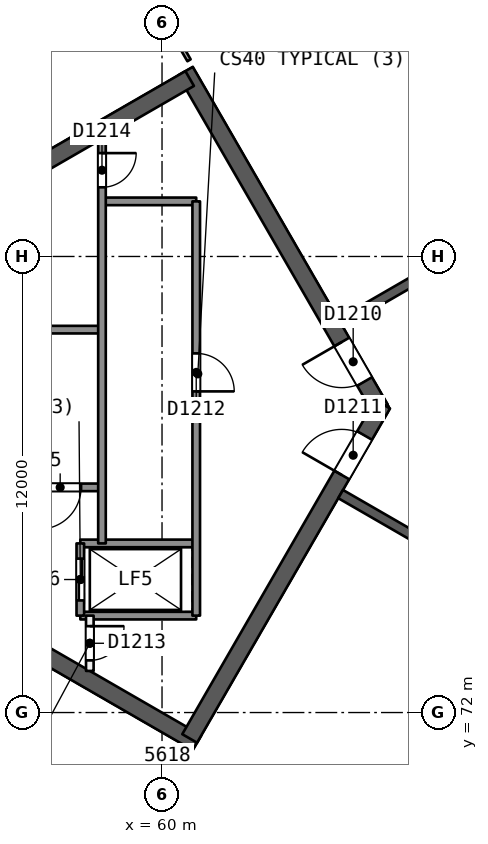
"""IFC4 building model, lengths in metres.
Left out: names, types, materials, properties, quantities, classifications, styles, units other than length and angle.
Written with IfcOpenShell. Run it as: python <this file> out.ifc"""

import sys

from ifc_helpers import new_model, si_unit, direction, frame, frame_2d, origin, place, context, subcontext, project, spatial, rectangle, extrude, element, fill, save


model = new_model("IFC4")
c1 = context("Model", 3, precision=1e-05, world=origin(), true_north=direction((0.0, 1.0)))
c2 = subcontext(c1, "Body", "Model", "MODEL_VIEW")
j1 = project(units=[si_unit("LENGTHUNIT", "METRE"), si_unit("PLANEANGLEUNIT", "RADIAN")], contexts=[c1])
p1 = place(None, origin())
s1 = spatial("IfcSite", under=j1, at=p1, CompositionType="ELEMENT")
p2 = place(p1, origin())
s2 = spatial("IfcBuilding", under=s1, at=p2, CompositionType="ELEMENT")
p3 = place(p2, frame((0.0, 0.0, 228.0)))
s3 = spatial("IfcBuildingStorey", under=s2, at=p3, CompositionType="ELEMENT", Elevation=228.0)
p4 = place(p3, frame((65.74, 80.0, 0.0), z_axis=(0.0, 0.0, 1.0), x_axis=(-0.499991857942, 0.866030104553, 0.0)))
e1 = element("IfcWall", 1, at=p4, inside=s3, PredefinedType="SHEAR", context=c2, shape_type="SweptSolid", body=[
    extrude(rectangle(XDim=10.25, YDim=0.45, at=frame_2d((5.125, 0.0))), origin(), (0.0, 0.0, 1.0), 3.7),
])
p5 = place(p4, frame((0.82, 0.0, 0.0)))
e2 = element("IfcOpeningElement", 2, at=p5, cuts=e1, PredefinedType="OPENING", context=c2, shape_type="SweptSolid", body=[
    extrude(rectangle(XDim=1.2, YDim=2.1, at=frame_2d((0.6, 1.05))), frame((0.0, 0.235, 0.0), z_axis=(0.0, -1.0, 0.0), x_axis=(1.0, 0.0, 0.0)), (0.0, 0.0, 1.0), 0.471),
])
p6 = place(p3, frame((60.728, 88.682, 0.0), z_axis=(0.0, 0.0, 1.0), x_axis=(-0.866021613849, -0.500006564303, 0.0)))
e3 = element("IfcWall", 3, at=p6, inside=s3, PredefinedType="SHEAR", context=c2, shape_type="SweptSolid", body=[
    extrude(rectangle(XDim=14.108, YDim=0.45, at=frame_2d((7.054, 0.0))), origin(), (0.0, 0.0, 1.0), 3.7),
])
p7 = place(p3, frame((48.622, 78.307, 0.0), z_axis=(0.0, 0.0, 1.0), x_axis=(0.86602701116, -0.499997215934, 0.0)))
e4 = element("IfcWall", 4, at=p7, inside=s3, PredefinedType="SHEAR", context=c2, shape_type="SweptSolid", body=[
    extrude(rectangle(XDim=14.204, YDim=0.45, at=frame_2d((7.102, 0.0))), origin(), (0.0, 0.0, 1.0), 3.7),
])
p8 = place(p3, frame((60.728, 71.318, 0.0), z_axis=(0.0, 0.0, 1.0), x_axis=(0.500012416173, 0.866018235185, 0.0)))
e5 = element("IfcWall", 5, at=p8, inside=s3, PredefinedType="SHEAR", context=c2, shape_type="SweptSolid", body=[
    extrude(rectangle(XDim=10.155, YDim=0.45, at=frame_2d((5.078, 0.0))), origin(), (0.0, 0.0, 1.0), 3.7),
])
p9 = place(p8, frame((8.005, 0.0, 0.0)))
e6 = element("IfcOpeningElement", 6, at=p9, cuts=e5, PredefinedType="OPENING", context=c2, shape_type="SweptSolid", body=[
    extrude(rectangle(XDim=1.2, YDim=2.1, at=frame_2d((0.6, 1.05))), frame((0.0, 0.235, 0.0), z_axis=(0.0, -1.0, 0.0), x_axis=(1.0, 0.0, 0.0)), (0.0, 0.0, 1.0), 0.471),
])
p10 = place(p3, frame((78.2, 90.046, 0.0), z_axis=(0.0, 0.0, 1.0), x_axis=(-0.866026492143, -0.499998114903, 0.0)))
e7 = element("IfcWall", 7, at=p10, inside=s3, PredefinedType="SHEAR", context=c2, shape_type="SweptSolid", body=[
    extrude(rectangle(XDim=15.588, YDim=0.25, at=frame_2d((7.794, 0.0))), origin(), (0.0, 0.0, 1.0), 3.3),
])
p11 = place(p10, frame((2.15, 0.0, 0.0)))
e8 = element("IfcOpeningElement", 8, at=p11, cuts=e7, PredefinedType="OPENING", context=c2, shape_type="SweptSolid", body=[
    extrude(rectangle(XDim=1.0, YDim=2.1, at=frame_2d((0.5, 1.05))), frame((0.0, 0.135, 0.0), z_axis=(0.0, -1.0, 0.0), x_axis=(1.0, 0.0, 0.0)), (0.0, 0.0, 1.0), 0.271),
])
p12 = place(p10, frame((8.538, 0.0, 0.0)))
e9 = element("IfcOpeningElement", 9, at=p12, cuts=e7, PredefinedType="OPENING", context=c2, shape_type="SweptSolid", body=[
    extrude(rectangle(XDim=1.1, YDim=2.1, at=frame_2d((0.55, 1.05))), frame((0.0, 0.135, 0.0), z_axis=(0.0, -1.0, 0.0), x_axis=(1.0, 0.0, 0.0)), (0.0, 0.0, 1.0), 0.271),
])
p13 = place(p10, frame((12.282, 0.0, 0.0)))
e10 = element("IfcOpeningElement", 10, at=p13, cuts=e7, PredefinedType="OPENING", context=c2, shape_type="SweptSolid", body=[
    extrude(rectangle(XDim=1.0, YDim=2.1, at=frame_2d((0.5, 1.05))), frame((0.0, 0.135, 0.0), z_axis=(0.0, -1.0, 0.0), x_axis=(1.0, 0.0, 0.0)), (0.0, 0.0, 1.0), 0.271),
])
p14 = place(p3, frame((64.7, 77.748, 0.0), z_axis=(0.0, 0.0, 1.0), x_axis=(0.866026492143, -0.499998114903, 0.0)))
e11 = element("IfcWall", 11, at=p14, inside=s3, PredefinedType="SHEAR", context=c2, shape_type="SweptSolid", body=[
    extrude(rectangle(XDim=15.588, YDim=0.25, at=frame_2d((7.794, 0.0))), origin(), (0.0, 0.0, 1.0), 3.3),
])
p15 = place(p14, frame((2.462, 0.0, 0.0)))
e12 = element("IfcOpeningElement", 12, at=p15, cuts=e11, PredefinedType="OPENING", context=c2, shape_type="SweptSolid", body=[
    extrude(rectangle(XDim=1.0, YDim=2.1, at=frame_2d((0.5, 1.05))), frame((0.0, 0.135, 0.0), z_axis=(0.0, -1.0, 0.0), x_axis=(1.0, 0.0, 0.0)), (0.0, 0.0, 1.0), 0.271),
])
p16 = place(p14, frame((9.474, 0.0, 0.0)))
e13 = element("IfcOpeningElement", 13, at=p16, cuts=e11, PredefinedType="OPENING", context=c2, shape_type="SweptSolid", body=[
    extrude(rectangle(XDim=1.1, YDim=2.1, at=frame_2d((0.55, 1.05))), frame((0.0, 0.135, 0.0), z_axis=(0.0, -1.0, 0.0), x_axis=(1.0, 0.0, 0.0)), (0.0, 0.0, 1.0), 0.271),
])
p17 = place(p14, frame((12.906, 0.0, 0.0)))
e14 = element("IfcOpeningElement", 14, at=p17, cuts=e11, PredefinedType="OPENING", context=c2, shape_type="SweptSolid", body=[
    extrude(rectangle(XDim=1.0, YDim=2.1, at=frame_2d((0.5, 1.05))), frame((0.0, 0.135, 0.0), z_axis=(0.0, -1.0, 0.0), x_axis=(1.0, 0.0, 0.0)), (0.0, 0.0, 1.0), 0.271),
])
p18 = place(p3, frame((64.433, 93.938, 0.0), z_axis=(0.0, 0.0, 1.0), x_axis=(0.500011000363, -0.866019052629, 0.0)))
e15 = element("IfcWall", 15, at=p18, inside=s3, PredefinedType="PARTITIONING", context=c2, shape_type="SweptSolid", body=[
    extrude(rectangle(XDim=10.254, YDim=0.2, at=frame_2d((5.127, 0.0))), origin(), (0.0, 0.0, 1.0), 3.3),
])
p19 = place(p3, frame((59.573, 91.132, 0.0), z_axis=(0.0, 0.0, 1.0), x_axis=(0.499948534732, -0.866055115232, 0.0)))
e16 = element("IfcWall", 16, at=p19, inside=s3, PredefinedType="PARTITIONING", context=c2, shape_type="SweptSolid", body=[
    extrude(rectangle(XDim=2.275, YDim=0.1, at=frame_2d((1.137, 0.0))), origin(), (0.0, 0.0, 1.0), 3.3),
])
p20 = place(p19, frame((0.687, 0.0, 0.0)))
e17 = element("IfcOpeningElement", 17, at=p20, cuts=e16, PredefinedType="OPENING", context=c2, shape_type="SweptSolid", body=[
    extrude(rectangle(XDim=0.9, YDim=2.1, at=frame_2d((0.45, 1.05))), frame((0.0, 0.061, 0.0), z_axis=(0.0, -1.0, 0.0), x_axis=(1.0, 0.0, 0.0)), (0.0, 0.0, 1.0), 0.121),
])
p21 = place(p3, frame((60.71, 70.838, 0.0), z_axis=(0.0, 0.0, 1.0), x_axis=(-0.499948534732, -0.866055115232, 0.0)))
e18 = element("IfcWall", 18, at=p21, inside=s3, PredefinedType="PARTITIONING", context=c2, shape_type="SweptSolid", body=[
    extrude(rectangle(XDim=2.275, YDim=0.1, at=frame_2d((1.137, 0.0))), origin(), (0.0, 0.0, 1.0), 3.3),
])
p22 = place(p21, frame((0.687, 0.0, 0.0)))
e19 = element("IfcOpeningElement", 19, at=p22, cuts=e18, PredefinedType="OPENING", context=c2, shape_type="SweptSolid", body=[
    extrude(rectangle(XDim=0.9, YDim=2.1, at=frame_2d((0.45, 1.05))), frame((0.0, 0.061, 0.0), z_axis=(0.0, -1.0, 0.0), x_axis=(1.0, 0.0, 0.0)), (0.0, 0.0, 1.0), 0.121),
])
p23 = place(p3, frame((64.703, 65.907, 0.0), z_axis=(0.0, 0.0, 1.0), x_axis=(0.500019628412, 0.866014071019, 0.0)))
e20 = element("IfcWall", 20, at=p23, inside=s3, PredefinedType="PARTITIONING", context=c2, shape_type="SweptSolid", body=[
    extrude(rectangle(XDim=7.254, YDim=0.2, at=frame_2d((3.627, 0.0))), origin(), (0.0, 0.0, 1.0), 3.3),
])
p24 = place(p3, frame((44.454, 82.574, 0.0), z_axis=(0.0, 0.0, 1.0), x_axis=(0.86602387423, 0.500002649256, 0.0)))
e21 = element("IfcWall", 21, at=p24, inside=s3, PredefinedType="SOLIDWALL", context=c2, shape_type="SweptSolid", body=[
    extrude(rectangle(XDim=50.333, YDim=0.3, at=frame_2d((25.167, 0.0))), origin(), (0.0, 0.0, 1.0), 3.3),
])
p25 = place(p24, frame((24.122, 0.0, 0.0)))
e22 = element("IfcOpeningElement", 22, at=p25, cuts=e21, PredefinedType="OPENING", context=c2, shape_type="SweptSolid", body=[
    extrude(rectangle(XDim=2.4, YDim=2.4, at=frame_2d((1.2, 1.2))), frame((0.0, 0.161, 0.0), z_axis=(0.0, -1.0, 0.0), x_axis=(1.0, 0.0, 0.0)), (0.0, 0.0, 1.0), 0.321),
])
p26 = place(p24, frame((29.111, 0.0, 0.0)))
e23 = element("IfcOpeningElement", 23, at=p26, cuts=e21, PredefinedType="OPENING", context=c2, shape_type="SweptSolid", body=[
    extrude(rectangle(XDim=2.4, YDim=2.4, at=frame_2d((1.2, 1.2))), frame((0.0, 0.161, 0.0), z_axis=(0.0, -1.0, 0.0), x_axis=(1.0, 0.0, 0.0)), (0.0, 0.0, 1.0), 0.321),
])
p27 = place(p24, frame((39.164, 0.0, 0.0)))
e24 = element("IfcOpeningElement", 24, at=p27, cuts=e21, PredefinedType="OPENING", context=c2, shape_type="SweptSolid", body=[
    extrude(rectangle(XDim=2.4, YDim=2.4, at=frame_2d((1.2, 1.2))), frame((0.0, 0.161, 0.0), z_axis=(0.0, -1.0, 0.0), x_axis=(1.0, 0.0, 0.0)), (0.0, 0.0, 1.0), 0.321),
])
p28 = place(p24, frame((18.978, 0.0, 0.0)))
e25 = element("IfcOpeningElement", 25, at=p28, cuts=e21, PredefinedType="OPENING", context=c2, shape_type="SweptSolid", body=[
    extrude(rectangle(XDim=2.4, YDim=2.4, at=frame_2d((1.2, 1.2))), frame((0.0, 0.161, 0.0), z_axis=(0.0, -1.0, 0.0), x_axis=(1.0, 0.0, 0.0)), (0.0, 0.0, 1.0), 0.321),
])
p29 = place(p24, frame((8.763, 0.0, 0.0)))
e26 = element("IfcOpeningElement", 26, at=p29, cuts=e21, PredefinedType="OPENING", context=c2, shape_type="SweptSolid", body=[
    extrude(rectangle(XDim=2.4, YDim=2.4, at=frame_2d((1.2, 1.2))), frame((0.0, 0.161, 0.0), z_axis=(0.0, -1.0, 0.0), x_axis=(1.0, 0.0, 0.0)), (0.0, 0.0, 1.0), 0.321),
])
p30 = place(p3, frame((88.043, 52.259, 0.0), z_axis=(0.0, 0.0, 1.0), x_axis=(-0.86602387423, 0.500002649256, 0.0)))
e27 = element("IfcWall", 27, at=p30, inside=s3, PredefinedType="SOLIDWALL", context=c2, shape_type="SweptSolid", body=[
    extrude(rectangle(XDim=50.333, YDim=0.3, at=frame_2d((25.167, 0.0))), origin(), (0.0, 0.0, 1.0), 3.3),
])
p31 = place(p30, frame((23.187, 0.0, 0.0)))
e28 = element("IfcOpeningElement", 28, at=p31, cuts=e27, PredefinedType="OPENING", context=c2, shape_type="SweptSolid", body=[
    extrude(rectangle(XDim=2.4, YDim=2.4, at=frame_2d((1.2, 1.2))), frame((0.0, 0.161, 0.0), z_axis=(0.0, -1.0, 0.0), x_axis=(1.0, 0.0, 0.0)), (0.0, 0.0, 1.0), 0.321),
])
p32 = place(p30, frame((28.799, 0.0, 0.0)))
e29 = element("IfcOpeningElement", 29, at=p32, cuts=e27, PredefinedType="OPENING", context=c2, shape_type="SweptSolid", body=[
    extrude(rectangle(XDim=2.4, YDim=2.4, at=frame_2d((1.2, 1.2))), frame((0.0, 0.161, 0.0), z_axis=(0.0, -1.0, 0.0), x_axis=(1.0, 0.0, 0.0)), (0.0, 0.0, 1.0), 0.321),
])
p33 = place(p30, frame((39.164, 0.0, 0.0)))
e30 = element("IfcOpeningElement", 30, at=p33, cuts=e27, PredefinedType="OPENING", context=c2, shape_type="SweptSolid", body=[
    extrude(rectangle(XDim=2.4, YDim=2.4, at=frame_2d((1.2, 1.2))), frame((0.0, 0.161, 0.0), z_axis=(0.0, -1.0, 0.0), x_axis=(1.0, 0.0, 0.0)), (0.0, 0.0, 1.0), 0.321),
])
p34 = place(p30, frame((18.354, 0.0, 0.0)))
e31 = element("IfcOpeningElement", 31, at=p34, cuts=e27, PredefinedType="OPENING", context=c2, shape_type="SweptSolid", body=[
    extrude(rectangle(XDim=2.4, YDim=2.4, at=frame_2d((1.2, 1.2))), frame((0.0, 0.161, 0.0), z_axis=(0.0, -1.0, 0.0), x_axis=(1.0, 0.0, 0.0)), (0.0, 0.0, 1.0), 0.321),
])
p35 = place(p30, frame((8.763, 0.0, 0.0)))
e32 = element("IfcOpeningElement", 32, at=p35, cuts=e27, PredefinedType="OPENING", context=c2, shape_type="SweptSolid", body=[
    extrude(rectangle(XDim=2.4, YDim=2.4, at=frame_2d((1.2, 1.2))), frame((0.0, 0.161, 0.0), z_axis=(0.0, -1.0, 0.0), x_axis=(1.0, 0.0, 0.0)), (0.0, 0.0, 1.0), 0.321),
])
p36 = place(p3, frame((60.9, 85.45, 0.0), z_axis=(0.0, 0.0, 1.0), x_axis=(-1.0, 0.0, 0.0)))
e33 = element("IfcWall", 33, at=p36, inside=s3, PredefinedType="SOLIDWALL", context=c2, shape_type="SweptSolid", body=[
    extrude(rectangle(XDim=2.48, YDim=0.2, at=frame_2d((1.24, 0.0))), origin(), (0.0, 0.0, 1.0), 3.3),
])
p37 = place(p3, frame((58.42, 82.075, 0.0), z_axis=(0.0, 0.0, 1.0), x_axis=(-1.0, 0.0, 0.0)))
e34 = element("IfcWall", 34, at=p37, inside=s3, PredefinedType="SOLIDWALL", context=c2, shape_type="SweptSolid", body=[
    extrude(rectangle(XDim=7.7, YDim=0.2, at=frame_2d((3.85, 0.0))), origin(), (0.0, 0.0, 1.0), 3.3),
])
p38 = place(p3, frame((58.42, 77.925, 0.0), z_axis=(0.0, 0.0, 1.0), x_axis=(-1.0, 0.0, 0.0)))
e35 = element("IfcWall", 35, at=p38, inside=s3, PredefinedType="SOLIDWALL", context=c2, shape_type="SweptSolid", body=[
    extrude(rectangle(XDim=7.7, YDim=0.2, at=frame_2d((3.85, 0.0))), origin(), (0.0, 0.0, 1.0), 3.3),
])
p39 = place(p38, frame((0.55, 0.0, 0.0)))
e36 = element("IfcOpeningElement", 36, at=p39, cuts=e35, PredefinedType="OPENING", context=c2, shape_type="SweptSolid", body=[
    extrude(rectangle(XDim=1.1, YDim=2.1, at=frame_2d((0.55, 1.05))), frame((0.0, 0.11, 0.0), z_axis=(0.0, -1.0, 0.0), x_axis=(1.0, 0.0, 0.0)), (0.0, 0.0, 1.0), 0.221),
])
for number, where, z_axis, x_axis in (
    (37, (60.9, 76.45, 0.0), (0.0, 0.0, 1.0), (-1.0, 0.0, 0.0)),
    (38, (60.9, 74.55, 0.0), (0.0, 0.0, 1.0), (-1.0, 0.0, 0.0)),
):
    element("IfcWall", number, at=place(p3, frame(where, z_axis=z_axis, x_axis=x_axis)), inside=s3, PredefinedType="SOLIDWALL", context=c2, shape_type="SweptSolid", body=[
        extrude(rectangle(XDim=3.05, YDim=0.2, at=frame_2d((1.525, 0.0))), origin(), (0.0, 0.0, 1.0), 3.3),
    ])
p40 = place(p3, frame((60.9, 85.45, 0.0), z_axis=(0.0, 0.0, 1.0), x_axis=(0.0, -1.0, 0.0)))
e39 = element("IfcWall", 39, at=p40, inside=s3, PredefinedType="SOLIDWALL", context=c2, shape_type="SweptSolid", body=[
    extrude(rectangle(XDim=10.9, YDim=0.2, at=frame_2d((5.45, 0.0))), origin(), (0.0, 0.0, 1.0), 3.3),
])
p41 = place(p40, frame((4.0, 0.0, 0.0)))
e40 = element("IfcOpeningElement", 40, at=p41, cuts=e39, PredefinedType="OPENING", context=c2, shape_type="SweptSolid", body=[
    extrude(rectangle(XDim=1.0, YDim=2.1, at=frame_2d((0.5, 1.05))), frame((0.0, 0.11, 0.0), z_axis=(0.0, -1.0, 0.0), x_axis=(1.0, 0.0, 0.0)), (0.0, 0.0, 1.0), 0.221),
])
p42 = place(p3, frame((58.42, 87.09, 0.0), z_axis=(0.0, 0.0, 1.0), x_axis=(0.0, -1.0, 0.0)))
e41 = element("IfcWall", 41, at=p42, inside=s3, PredefinedType="SOLIDWALL", context=c2, shape_type="SweptSolid", body=[
    extrude(rectangle(XDim=10.64, YDim=0.2, at=frame_2d((5.32, 0.0))), origin(), (0.0, 0.0, 1.0), 3.3),
])
p43 = place(p42, frame((0.37, 0.0, 0.0)))
e42 = element("IfcOpeningElement", 42, at=p43, cuts=e41, PredefinedType="OPENING", context=c2, shape_type="SweptSolid", body=[
    extrude(rectangle(XDim=0.9, YDim=2.1, at=frame_2d((0.45, 1.05))), frame((0.0, 0.11, 0.0), z_axis=(0.0, -1.0, 0.0), x_axis=(1.0, 0.0, 0.0)), (0.0, 0.0, 1.0), 0.221),
])
p44 = place(p3, frame((58.1, 74.55, 0.0), z_axis=(0.0, 0.0, 1.0), x_axis=(0.0, -1.0, 0.0)))
e43 = element("IfcWall", 43, at=p44, inside=s3, PredefinedType="PARTITIONING", context=c2, shape_type="SweptSolid", body=[
    extrude(rectangle(XDim=1.455, YDim=0.2, at=frame_2d((0.728, 0.0))), origin(), (0.0, 0.0, 1.0), 3.3),
])
p45 = place(p44, frame((0.278, 0.0, 0.0)))
e44 = element("IfcOpeningElement", 44, at=p45, cuts=e43, PredefinedType="OPENING", context=c2, shape_type="SweptSolid", body=[
    extrude(rectangle(XDim=0.9, YDim=2.1, at=frame_2d((0.45, 1.05))), frame((0.0, 0.11, 0.0), z_axis=(0.0, -1.0, 0.0), x_axis=(1.0, 0.0, 0.0)), (0.0, 0.0, 1.0), 0.221),
])
p46 = place(p3, frame((57.85, 76.45, 0.0), z_axis=(0.0, 0.0, 1.0), x_axis=(0.0, -1.0, 0.0)))
e45 = element("IfcWall", 45, at=p46, inside=s3, PredefinedType="SOLIDWALL", context=c2, shape_type="SweptSolid", body=[
    extrude(rectangle(XDim=1.9, YDim=0.2, at=frame_2d((0.95, 0.0))), origin(), (0.0, 0.0, 1.0), 3.3),
])
p47 = place(p46, frame((0.4, 0.0, 0.0)))
e46 = element("IfcOpeningElement", 46, at=p47, cuts=e45, PredefinedType="OPENING", context=c2, shape_type="SweptSolid", body=[
    extrude(rectangle(XDim=1.1, YDim=2.1, at=frame_2d((0.55, 1.05))), frame((0.0, 0.11, 0.0), z_axis=(0.0, -1.0, 0.0), x_axis=(1.0, 0.0, 0.0)), (0.0, 0.0, 1.0), 0.221),
])
p48 = place(p5, origin())
e47 = element("IfcDoor", 47, at=p48, inside=s3, OperationType="SINGLE_SWING_RIGHT", PredefinedType="NOTDEFINED", context=c2, shape_type="SweptSolid", body=[
    extrude(rectangle(XDim=1.2, YDim=2.1, at=frame_2d((0.6, 1.05))), frame((0.0, 0.025, 0.0), z_axis=(0.0, -1.0, 0.0), x_axis=(1.0, 0.0, 0.0)), (0.0, 0.0, 1.0), 0.05),
])
fill(e2, e47)
p49 = place(p9, origin())
e48 = element("IfcDoor", 48, at=p49, inside=s3, OperationType="SINGLE_SWING_LEFT", PredefinedType="NOTDEFINED", context=c2, shape_type="SweptSolid", body=[
    extrude(rectangle(XDim=1.2, YDim=2.1, at=frame_2d((0.6, 1.05))), frame((0.0, 0.025, 0.0), z_axis=(0.0, -1.0, 0.0), x_axis=(1.0, 0.0, 0.0)), (0.0, 0.0, 1.0), 0.05),
])
fill(e6, e48)
p50 = place(p47, origin())
e49 = element("IfcDoor", 49, at=p50, inside=s3, OperationType="SLIDING_TO_RIGHT", PredefinedType="NOTDEFINED", context=c2, shape_type="SweptSolid", body=[
    extrude(rectangle(XDim=1.1, YDim=2.1, at=frame_2d((0.55, 1.05))), frame((0.0, 0.025, 0.0), z_axis=(0.0, -1.0, 0.0), x_axis=(1.0, 0.0, 0.0)), (0.0, 0.0, 1.0), 0.05),
])
fill(e46, e49)
p51 = place(p41, origin())
e50 = element("IfcDoor", 50, at=p51, inside=s3, OperationType="SINGLE_SWING_RIGHT", PredefinedType="NOTDEFINED", context=c2, shape_type="SweptSolid", body=[
    extrude(rectangle(XDim=1.0, YDim=2.1, at=frame_2d((0.5, 1.05))), frame((0.0, 0.025, 0.0), z_axis=(0.0, -1.0, 0.0), x_axis=(1.0, 0.0, 0.0)), (0.0, 0.0, 1.0), 0.05),
])
fill(e40, e50)
p52 = place(p45, origin())
e51 = element("IfcDoor", 51, at=p52, inside=s3, OperationType="SINGLE_SWING_LEFT", PredefinedType="NOTDEFINED", context=c2, shape_type="SweptSolid", body=[
    extrude(rectangle(XDim=0.9, YDim=2.1, at=frame_2d((0.45, 1.05))), frame((0.0, 0.025, 0.0), z_axis=(0.0, -1.0, 0.0), x_axis=(1.0, 0.0, 0.0)), (0.0, 0.0, 1.0), 0.05),
])
fill(e44, e51)
p53 = place(p43, origin())
e52 = element("IfcDoor", 52, at=p53, inside=s3, OperationType="SINGLE_SWING_LEFT", PredefinedType="NOTDEFINED", context=c2, shape_type="SweptSolid", body=[
    extrude(rectangle(XDim=0.9, YDim=2.1, at=frame_2d((0.45, 1.05))), frame((0.0, 0.025, 0.0), z_axis=(0.0, -1.0, 0.0), x_axis=(1.0, 0.0, 0.0)), (0.0, 0.0, 1.0), 0.05),
])
fill(e42, e52)
p54 = place(p39, origin())
e53 = element("IfcDoor", 53, at=p54, inside=s3, OperationType="SINGLE_SWING_RIGHT", PredefinedType="NOTDEFINED", context=c2, shape_type="SweptSolid", body=[
    extrude(rectangle(XDim=1.1, YDim=2.1, at=frame_2d((0.55, 1.05))), frame((0.0, 0.025, 0.0), z_axis=(0.0, -1.0, 0.0), x_axis=(1.0, 0.0, 0.0)), (0.0, 0.0, 1.0), 0.05),
])
fill(e36, e53)
save(model, sys.argv[1])
